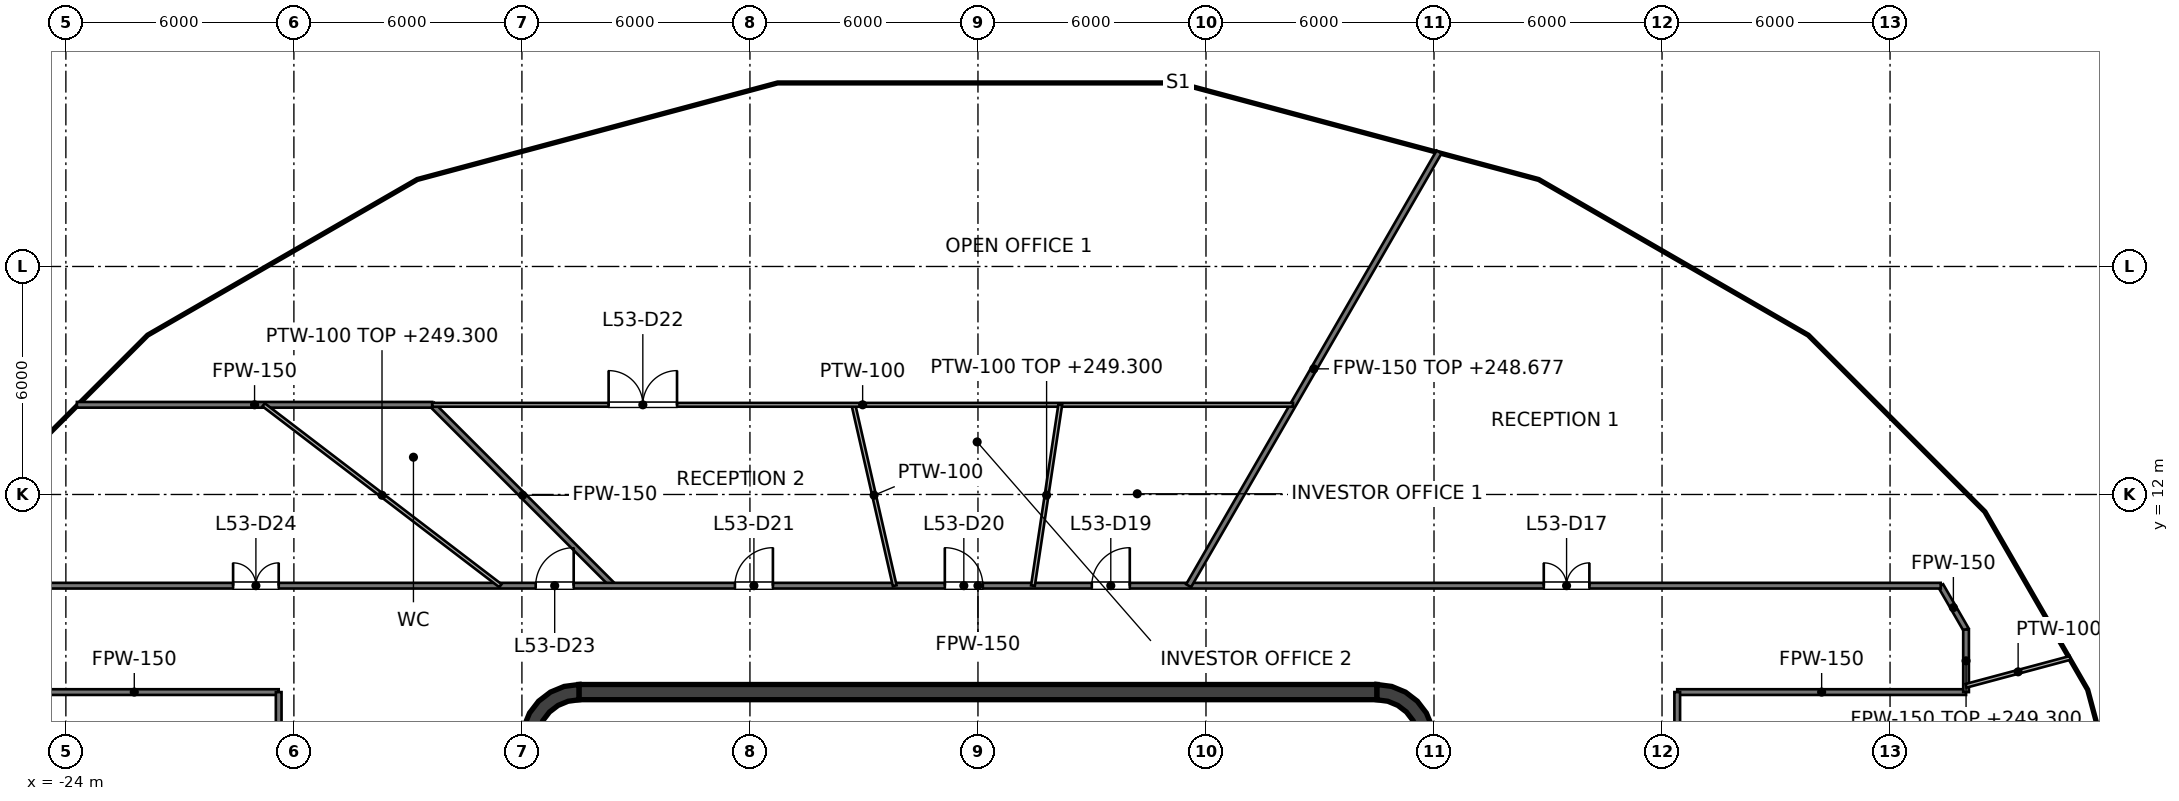
"""IFC4 building model, lengths in metres.
Left out: names, types, materials, properties, quantities, classifications, styles, units other than length and angle.
Written with IfcOpenShell. Run it as: python <this file> out.ifc"""

import sys

from ifc_helpers import new_model, si_unit, direction, frame, frame_2d, origin, place, context, subcontext, project, spatial, polyline, rectangle, outline, extrude, element, fill, save


model = new_model("IFC4")
c1 = context("Model", 3, precision=1e-05, world=origin(), true_north=direction((0.0, 1.0)))
c2 = subcontext(c1, "Body", "Model", "MODEL_VIEW")
j1 = project(units=[si_unit("LENGTHUNIT", "METRE"), si_unit("PLANEANGLEUNIT", "RADIAN")], contexts=[c1])
p1 = place(None, origin())
s1 = spatial("IfcSite", under=j1, at=p1, CompositionType="ELEMENT")
p2 = place(p1, origin())
s2 = spatial("IfcBuilding", under=s1, at=p2, CompositionType="ELEMENT")
p3 = place(p2, frame((0.0, 0.0, 245.6)))
s3 = spatial("IfcBuildingStorey", under=s2, at=p3, CompositionType="ELEMENT", Elevation=245.6)
p4 = place(p3, frame((-10.5, 6.8, 0.0), z_axis=(0.0, 0.0, 1.0), x_axis=(1.0, 0.0, 0.0)))
e1 = element("IfcWall", 1, at=p4, inside=s3, PredefinedType="SHEAR", context=c2, shape_type="SweptSolid", body=[
    extrude(rectangle(XDim=21.0, YDim=0.4, at=frame_2d((10.5, 0.0))), origin(), (0.0, 0.0, 1.0), 4.0),
])
p5 = place(p3, origin())
e2 = element("IfcWall", 2, at=p5, inside=s3, PredefinedType="SHEAR", context=c2, shape_type="SweptSolid", body=[
    extrude(outline(polyline([(10.5, 7.0), (10.5, 6.596), (10.784, 6.559), (11.048, 6.45), (11.275, 6.275), (11.45, 6.048), (11.559, 5.784), (11.596, 5.5), (12.0, 5.5), (11.949, 5.888), (11.799, 6.25), (11.561, 6.561), (11.25, 6.799), (10.888, 6.949), (10.5, 7.0)])), origin(), (0.0, 0.0, 1.0), 4.0),
])
e3 = element("IfcWall", 3, at=p5, inside=s3, PredefinedType="SHEAR", context=c2, shape_type="SweptSolid", body=[
    extrude(outline(polyline([(-12.0, 5.5), (-11.596, 5.5), (-11.559, 5.784), (-11.45, 6.048), (-11.275, 6.275), (-11.048, 6.45), (-10.784, 6.559), (-10.5, 6.596), (-10.5, 7.0), (-10.888, 6.949), (-11.25, 6.799), (-11.561, 6.561), (-11.799, 6.25), (-11.949, 5.888), (-12.0, 5.5)])), origin(), (0.0, 0.0, 1.0), 4.0),
])
p6 = place(p3, frame((-9.0, 4.1, 0.0), z_axis=(0.0, 0.0, 1.0), x_axis=(0.0, 1.0, 0.0)))
e4 = element("IfcWall", 4, at=p6, inside=s3, PredefinedType="SOLIDWALL", context=c2, shape_type="SweptSolid", body=[
    extrude(rectangle(XDim=2.5, YDim=0.25, at=frame_2d((1.25, 0.0))), origin(), (0.0, 0.0, 1.0), 3.7),
])
p7 = place(p6, frame((0.65, 0.0, 0.0)))
e5 = element("IfcOpeningElement", 5, at=p7, cuts=e4, PredefinedType="OPENING", context=c2, shape_type="SweptSolid", body=[
    extrude(rectangle(XDim=1.2, YDim=2.1, at=frame_2d((0.6, 1.05))), frame((0.0, 0.125, 0.0), z_axis=(0.0, -1.0, 0.0), x_axis=(1.0, 0.0, 0.0)), (0.0, 0.0, 1.0), 0.25),
])
p8 = place(p3, frame((9.0, 4.1, 0.0), z_axis=(0.0, 0.0, 1.0), x_axis=(0.0, 1.0, 0.0)))
e6 = element("IfcWall", 6, at=p8, inside=s3, PredefinedType="SOLIDWALL", context=c2, shape_type="SweptSolid", body=[
    extrude(rectangle(XDim=2.5, YDim=0.25, at=frame_2d((1.25, 0.0))), origin(), (0.0, 0.0, 1.0), 3.7),
])
p9 = place(p8, frame((0.65, 0.0, 0.0)))
e7 = element("IfcOpeningElement", 7, at=p9, cuts=e6, PredefinedType="OPENING", context=c2, shape_type="SweptSolid", body=[
    extrude(rectangle(XDim=1.2, YDim=2.1, at=frame_2d((0.6, 1.05))), frame((0.0, 0.125, 0.0), z_axis=(0.0, -1.0, 0.0), x_axis=(1.0, 0.0, 0.0)), (0.0, 0.0, 1.0), 0.25),
])
for number, where, z_axis, x_axis in (
    (8, (-3.15, 4.1, 0.0), (0.0, 0.0, 1.0), (0.0, 1.0, 0.0)),
    (9, (3.15, 4.1, 0.0), (0.0, 0.0, 1.0), (0.0, 1.0, 0.0)),
):
    element("IfcWall", number, at=place(p3, frame(where, z_axis=z_axis, x_axis=x_axis)), inside=s3, PredefinedType="SOLIDWALL", context=c2, shape_type="SweptSolid", body=[
        extrude(rectangle(XDim=2.5, YDim=0.25, at=frame_2d((1.25, 0.0))), origin(), (0.0, 0.0, 1.0), 3.7),
    ])
p10 = place(p3, frame((25.333, 9.6, 0.0), z_axis=(0.0, 0.0, 1.0), x_axis=(0.500076310463, -0.865981341435, 0.0)))
e10 = element("IfcWall", 10, at=p10, inside=s3, PredefinedType="PARTITIONING", context=c2, shape_type="SweptSolid", body=[
    extrude(rectangle(XDim=1.334, YDim=0.15, at=frame_2d((0.667, 0.0))), origin(), (0.0, 0.0, 1.0), 2.768),
])
p11 = place(p3, frame((-14.36, 14.36, 0.0), z_axis=(0.0, 0.0, 1.0), x_axis=(0.707106781187, -0.707106781187, 0.0)))
e11 = element("IfcWall", 11, at=p11, inside=s3, PredefinedType="PARTITIONING", context=c2, shape_type="SweptSolid", body=[
    extrude(rectangle(XDim=6.732, YDim=0.15, at=frame_2d((3.366, 0.0))), origin(), (0.0, 0.0, 1.0), 2.768),
])
for number, where, z_axis, x_axis in (
    (12, (-26.0, 6.8, 0.0), (0.0, 0.0, 1.0), (1.0, 0.0, 0.0)),
    (13, (18.4, 6.8, 0.0), (0.0, 0.0, 1.0), (1.0, 0.0, 0.0)),
):
    element("IfcWall", number, at=place(p3, frame(where, z_axis=z_axis, x_axis=x_axis)), inside=s3, PredefinedType="PARTITIONING", context=c2, shape_type="SweptSolid", body=[
        extrude(rectangle(XDim=7.6, YDim=0.15, at=frame_2d((3.8, 0.0))), origin(), (0.0, 0.0, 1.0), 2.768),
    ])
p12 = place(p3, frame((-25.333, 9.6, 0.0), z_axis=(0.0, 0.0, 1.0), x_axis=(1.0, 0.0, 0.0)))
e14 = element("IfcWall", 14, at=p12, inside=s3, PredefinedType="PARTITIONING", context=c2, shape_type="SweptSolid", body=[
    extrude(rectangle(XDim=50.666, YDim=0.15, at=frame_2d((25.333, 0.0))), origin(), (0.0, 0.0, 1.0), 2.768),
])
p13 = place(p12, frame((40.221, 0.0, 0.0)))
e15 = element("IfcOpeningElement", 15, at=p13, cuts=e14, PredefinedType="OPENING", context=c2, shape_type="SweptSolid", body=[
    extrude(rectangle(XDim=1.2, YDim=2.1, at=frame_2d((0.6, 1.05))), frame((0.0, 0.075, 0.0), z_axis=(0.0, -1.0, 0.0), x_axis=(1.0, 0.0, 0.0)), (0.0, 0.0, 1.0), 0.15),
])
p14 = place(p12, frame((28.328, 0.0, 0.0)))
e16 = element("IfcOpeningElement", 16, at=p14, cuts=e14, PredefinedType="OPENING", context=c2, shape_type="SweptSolid", body=[
    extrude(rectangle(XDim=1.0, YDim=2.1, at=frame_2d((0.5, 1.05))), frame((0.0, 0.075, 0.0), z_axis=(0.0, -1.0, 0.0), x_axis=(1.0, 0.0, 0.0)), (0.0, 0.0, 1.0), 0.15),
])
p15 = place(p12, frame((24.461, 0.0, 0.0)))
e17 = element("IfcOpeningElement", 17, at=p15, cuts=e14, PredefinedType="OPENING", context=c2, shape_type="SweptSolid", body=[
    extrude(rectangle(XDim=1.0, YDim=2.1, at=frame_2d((0.5, 1.05))), frame((0.0, 0.075, 0.0), z_axis=(0.0, -1.0, 0.0), x_axis=(1.0, 0.0, 0.0)), (0.0, 0.0, 1.0), 0.15),
])
p16 = place(p12, frame((18.938, 0.0, 0.0)))
e18 = element("IfcOpeningElement", 18, at=p16, cuts=e14, PredefinedType="OPENING", context=c2, shape_type="SweptSolid", body=[
    extrude(rectangle(XDim=1.0, YDim=2.1, at=frame_2d((0.5, 1.05))), frame((0.0, 0.075, 0.0), z_axis=(0.0, -1.0, 0.0), x_axis=(1.0, 0.0, 0.0)), (0.0, 0.0, 1.0), 0.15),
])
p17 = place(p12, frame((13.695, 0.0, 0.0)))
e19 = element("IfcOpeningElement", 19, at=p17, cuts=e14, PredefinedType="OPENING", context=c2, shape_type="SweptSolid", body=[
    extrude(rectangle(XDim=1.0, YDim=2.1, at=frame_2d((0.5, 1.05))), frame((0.0, 0.075, 0.0), z_axis=(0.0, -1.0, 0.0), x_axis=(1.0, 0.0, 0.0)), (0.0, 0.0, 1.0), 0.15),
])
p18 = place(p12, frame((5.733, 0.0, 0.0)))
e20 = element("IfcOpeningElement", 20, at=p18, cuts=e14, PredefinedType="OPENING", context=c2, shape_type="SweptSolid", body=[
    extrude(rectangle(XDim=1.2, YDim=2.1, at=frame_2d((0.6, 1.05))), frame((0.0, 0.075, 0.0), z_axis=(0.0, -1.0, 0.0), x_axis=(1.0, 0.0, 0.0)), (0.0, 0.0, 1.0), 0.15),
])
p19 = place(p3, frame((-23.71, 14.36, 0.0), z_axis=(0.0, 0.0, 1.0), x_axis=(1.0, 0.0, 0.0)))
e21 = element("IfcWall", 21, at=p19, inside=s3, PredefinedType="PARTITIONING", context=c2, shape_type="SweptSolid", body=[
    extrude(rectangle(XDim=9.35, YDim=0.15, at=frame_2d((4.675, 0.0))), origin(), (0.0, 0.0, 1.0), 2.768),
])
p20 = place(p3, frame((5.543, 9.6, 0.0), z_axis=(0.0, 0.0, 1.0), x_axis=(0.500044242988, 0.865999858577, 0.0)))
e22 = element("IfcWall", 22, at=p20, inside=s3, PredefinedType="PARTITIONING", context=c2, shape_type="SweptSolid", body=[
    extrude(rectangle(XDim=13.178, YDim=0.15, at=frame_2d((6.589, 0.0))), origin(), (0.0, 0.0, 1.0), 3.077),
])
p21 = place(p3, frame((26.0, 6.8, 0.0), z_axis=(0.0, 0.0, 1.0), x_axis=(0.0, 1.0, 0.0)))
e23 = element("IfcWall", 23, at=p21, inside=s3, PredefinedType="PARTITIONING", context=c2, shape_type="SweptSolid", body=[
    extrude(rectangle(XDim=1.645, YDim=0.15, at=frame_2d((0.823, 0.0))), origin(), (0.0, 0.0, 1.0), 3.7),
])
p22 = place(p3, frame((18.4, -6.8, 0.0), z_axis=(0.0, 0.0, 1.0), x_axis=(0.0, 1.0, 0.0)))
e24 = element("IfcWall", 24, at=p22, inside=s3, PredefinedType="PARTITIONING", context=c2, shape_type="SweptSolid", body=[
    extrude(rectangle(XDim=13.6, YDim=0.15, at=frame_2d((6.8, 0.0))), origin(), (0.0, 0.0, 1.0), 2.768),
])
p23 = place(p22, frame((6.2, 0.0, 0.0)))
e25 = element("IfcOpeningElement", 25, at=p23, cuts=e24, PredefinedType="OPENING", context=c2, shape_type="SweptSolid", body=[
    extrude(rectangle(XDim=1.2, YDim=2.1, at=frame_2d((0.6, 1.05))), frame((0.0, 0.075, 0.0), z_axis=(0.0, -1.0, 0.0), x_axis=(1.0, 0.0, 0.0)), (0.0, 0.0, 1.0), 0.15),
])
p24 = place(p3, frame((-18.4, -6.8, 0.0), z_axis=(0.0, 0.0, 1.0), x_axis=(0.0, 1.0, 0.0)))
e26 = element("IfcWall", 26, at=p24, inside=s3, PredefinedType="PARTITIONING", context=c2, shape_type="SweptSolid", body=[
    extrude(rectangle(XDim=13.6, YDim=0.15, at=frame_2d((6.8, 0.0))), origin(), (0.0, 0.0, 1.0), 2.768),
])
p25 = place(p3, frame((-3.277, 14.36, 0.0), z_axis=(0.0, 0.0, 1.0), x_axis=(0.222470409815, -0.97493944261, 0.0)))
e27 = element("IfcWall", 27, at=p25, inside=s3, PredefinedType="PARTITIONING", context=c2, shape_type="SweptSolid", body=[
    extrude(rectangle(XDim=4.882, YDim=0.1, at=frame_2d((2.441, 0.0))), origin(), (0.0, 0.0, 1.0), 2.768),
])
p26 = place(p3, frame((-18.797, 14.36, 0.0), z_axis=(0.0, 0.0, 1.0), x_axis=(0.794667043869, -0.607045541445, 0.0)))
e28 = element("IfcWall", 28, at=p26, inside=s3, PredefinedType="PARTITIONING", context=c2, shape_type="SweptSolid", body=[
    extrude(rectangle(XDim=7.841, YDim=0.1, at=frame_2d((3.921, 0.0))), origin(), (0.0, 0.0, 1.0), 3.7),
])
p27 = place(p3, frame((-14.36, 14.36, 0.0), z_axis=(0.0, 0.0, 1.0), x_axis=(1.0, 0.0, 0.0)))
e29 = element("IfcWall", 29, at=p27, inside=s3, PredefinedType="PARTITIONING", context=c2, shape_type="SweptSolid", body=[
    extrude(rectangle(XDim=22.651, YDim=0.1, at=frame_2d((11.326, 0.0))), origin(), (0.0, 0.0, 1.0), 2.768),
])
p28 = place(p27, frame((4.642, 0.0, 0.0)))
e30 = element("IfcOpeningElement", 30, at=p28, cuts=e29, PredefinedType="OPENING", context=c2, shape_type="SweptSolid", body=[
    extrude(rectangle(XDim=1.8, YDim=2.1, at=frame_2d((0.9, 1.05))), frame((0.0, 0.05, 0.0), z_axis=(0.0, -1.0, 0.0), x_axis=(1.0, 0.0, 0.0)), (0.0, 0.0, 1.0), 0.1),
])
p29 = place(p3, frame((26.0, 6.966, 0.0), z_axis=(0.0, 0.0, 1.0), x_axis=(0.965951508514, 0.258723178704, 0.0)))
e31 = element("IfcWall", 31, at=p29, inside=s3, PredefinedType="PARTITIONING", context=c2, shape_type="SweptSolid", body=[
    extrude(rectangle(XDim=2.837, YDim=0.1, at=frame_2d((1.418, 0.0))), origin(), (0.0, 0.0, 1.0), 3.325),
])
p30 = place(p3, frame((1.447, 9.6, 0.0), z_axis=(0.0, 0.0, 1.0), x_axis=(0.149156325557, 0.988813627812, 0.0)))
e32 = element("IfcWall", 32, at=p30, inside=s3, PredefinedType="PARTITIONING", context=c2, shape_type="SweptSolid", body=[
    extrude(rectangle(XDim=4.814, YDim=0.1, at=frame_2d((2.407, 0.0))), origin(), (0.0, 0.0, 1.0), 3.7),
])
p31 = place(p13, origin())
e33 = element("IfcDoor", 33, at=p31, inside=s3, OperationType="DOUBLE_DOOR_SINGLE_SWING", PredefinedType="DOOR", context=c2, shape_type="SweptSolid", body=[
    extrude(rectangle(XDim=1.2, YDim=2.1, at=frame_2d((0.6, 1.05))), frame((0.0, 0.025, 0.0), z_axis=(0.0, -1.0, 0.0), x_axis=(1.0, 0.0, 0.0)), (0.0, 0.0, 1.0), 0.05),
])
fill(e15, e33)
p32 = place(p14, origin())
e34 = element("IfcDoor", 34, at=p32, inside=s3, OperationType="SINGLE_SWING_RIGHT", PredefinedType="DOOR", context=c2, shape_type="SweptSolid", body=[
    extrude(rectangle(XDim=1.0, YDim=2.1, at=frame_2d((0.5, 1.05))), frame((0.0, 0.025, 0.0), z_axis=(0.0, -1.0, 0.0), x_axis=(1.0, 0.0, 0.0)), (0.0, 0.0, 1.0), 0.05),
])
fill(e16, e34)
p33 = place(p15, origin())
e35 = element("IfcDoor", 35, at=p33, inside=s3, OperationType="SINGLE_SWING_LEFT", PredefinedType="DOOR", context=c2, shape_type="SweptSolid", body=[
    extrude(rectangle(XDim=1.0, YDim=2.1, at=frame_2d((0.5, 1.05))), frame((0.0, 0.025, 0.0), z_axis=(0.0, -1.0, 0.0), x_axis=(1.0, 0.0, 0.0)), (0.0, 0.0, 1.0), 0.05),
])
fill(e17, e35)
p34 = place(p16, origin())
e36 = element("IfcDoor", 36, at=p34, inside=s3, OperationType="SINGLE_SWING_RIGHT", PredefinedType="DOOR", context=c2, shape_type="SweptSolid", body=[
    extrude(rectangle(XDim=1.0, YDim=2.1, at=frame_2d((0.5, 1.05))), frame((0.0, 0.025, 0.0), z_axis=(0.0, -1.0, 0.0), x_axis=(1.0, 0.0, 0.0)), (0.0, 0.0, 1.0), 0.05),
])
fill(e18, e36)
p35 = place(p28, origin())
e37 = element("IfcDoor", 37, at=p35, inside=s3, OperationType="DOUBLE_DOOR_SINGLE_SWING", PredefinedType="DOOR", context=c2, shape_type="SweptSolid", body=[
    extrude(rectangle(XDim=1.8, YDim=2.1, at=frame_2d((0.9, 1.05))), frame((0.0, 0.025, 0.0), z_axis=(0.0, -1.0, 0.0), x_axis=(1.0, 0.0, 0.0)), (0.0, 0.0, 1.0), 0.05),
])
fill(e30, e37)
p36 = place(p17, origin())
e38 = element("IfcDoor", 38, at=p36, inside=s3, OperationType="SINGLE_SWING_RIGHT", PredefinedType="DOOR", context=c2, shape_type="SweptSolid", body=[
    extrude(rectangle(XDim=1.0, YDim=2.1, at=frame_2d((0.5, 1.05))), frame((0.0, 0.025, 0.0), z_axis=(0.0, -1.0, 0.0), x_axis=(1.0, 0.0, 0.0)), (0.0, 0.0, 1.0), 0.05),
])
fill(e19, e38)
p37 = place(p18, origin())
e39 = element("IfcDoor", 39, at=p37, inside=s3, OperationType="DOUBLE_DOOR_SINGLE_SWING", PredefinedType="DOOR", context=c2, shape_type="SweptSolid", body=[
    extrude(rectangle(XDim=1.2, YDim=2.1, at=frame_2d((0.6, 1.05))), frame((0.0, 0.025, 0.0), z_axis=(0.0, -1.0, 0.0), x_axis=(1.0, 0.0, 0.0)), (0.0, 0.0, 1.0), 0.05),
])
fill(e20, e39)
save(model, sys.argv[1])
